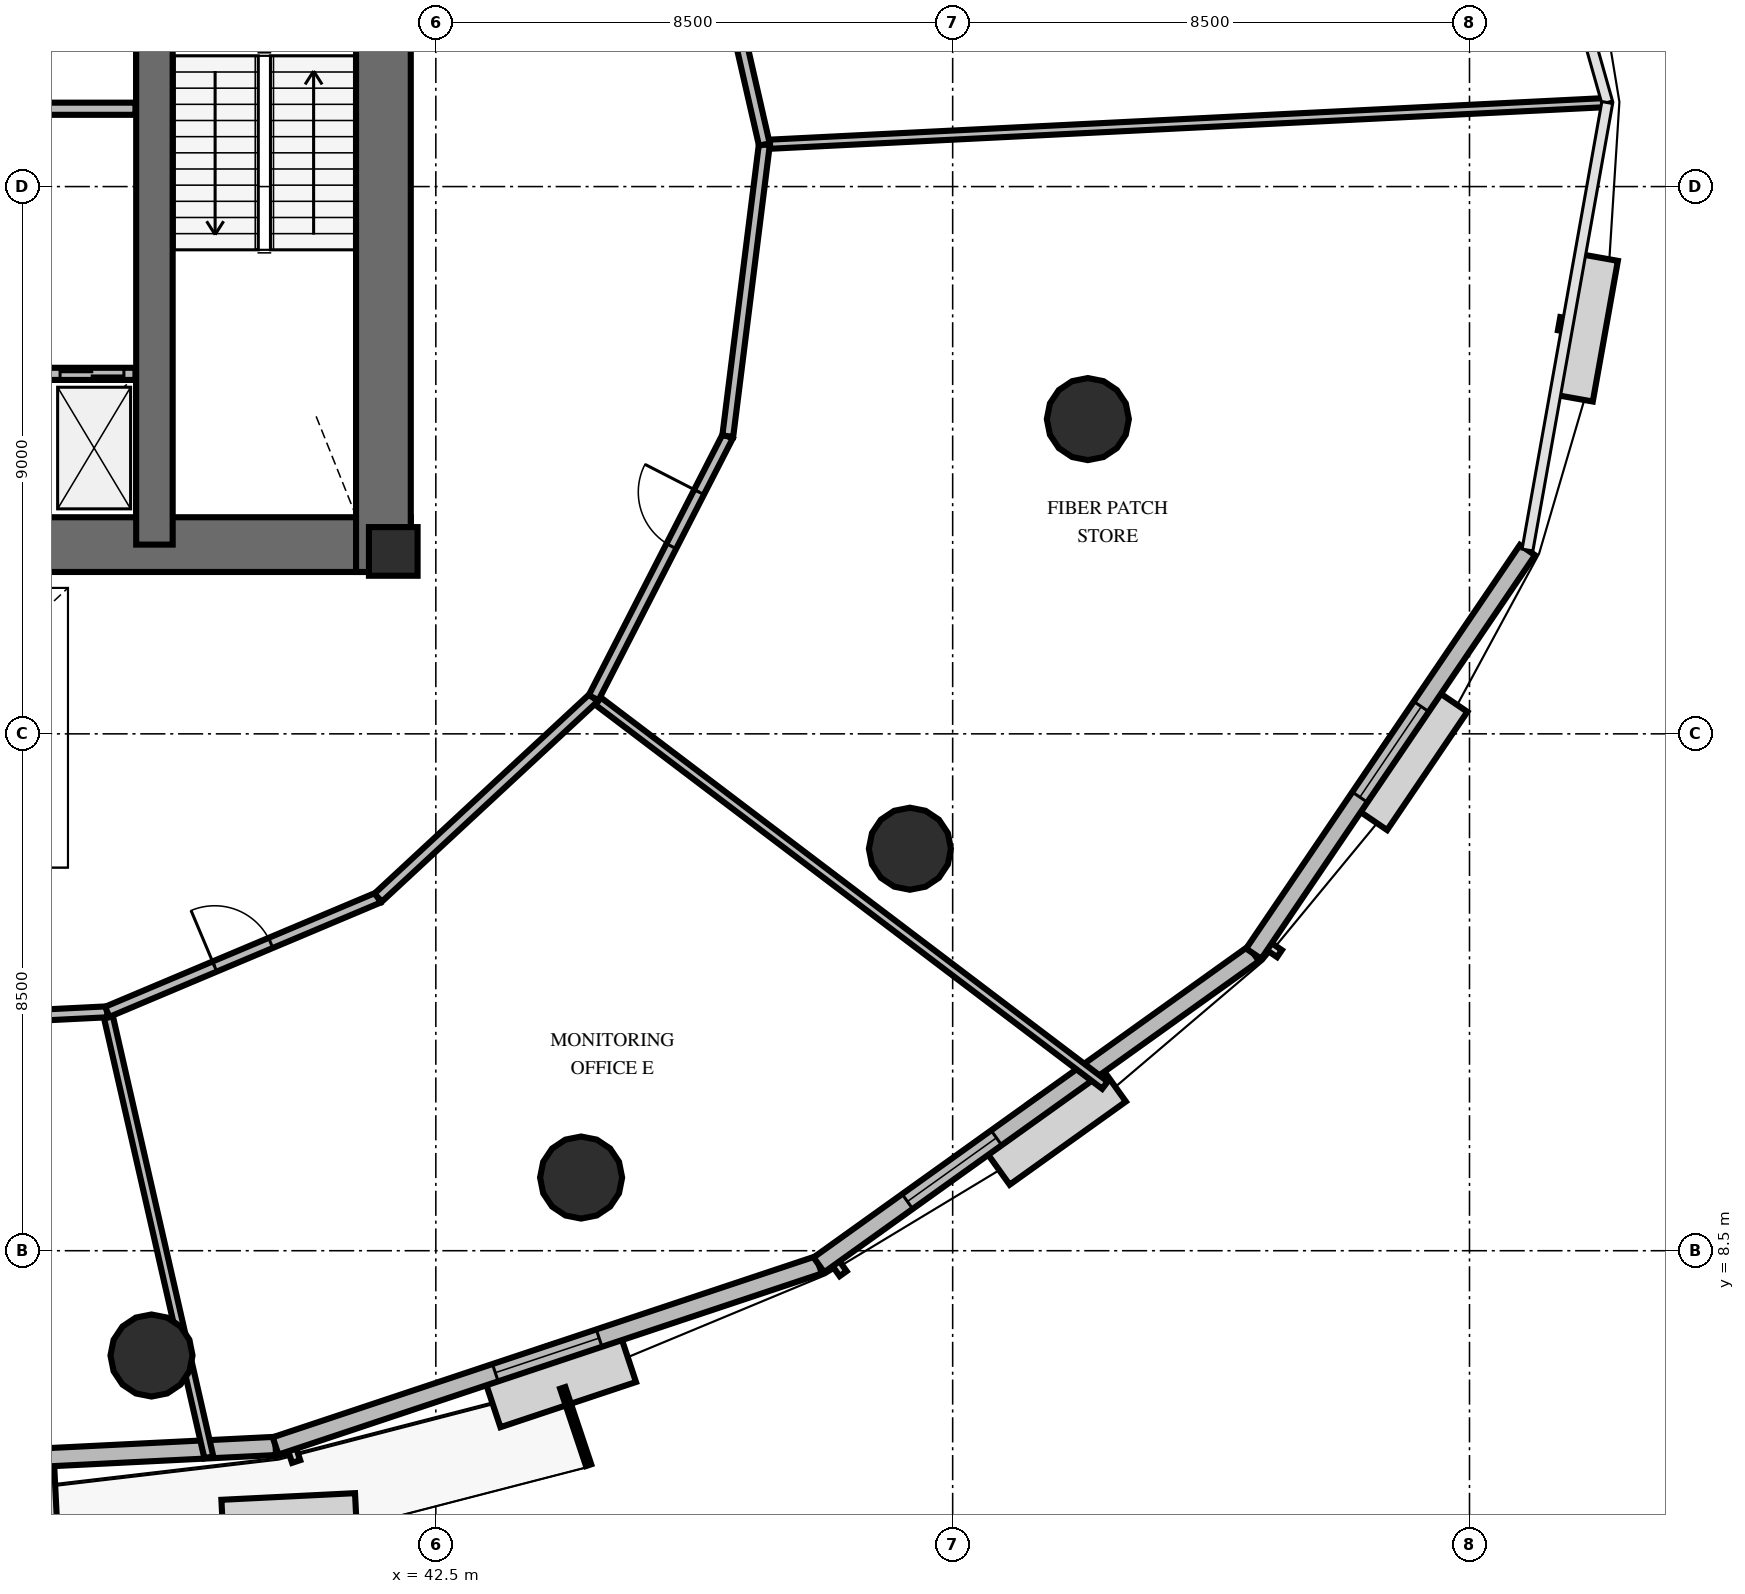
"""IFC4 building model, lengths in metres.
Left out: names, types, materials, properties, quantities, classifications, styles, units other than length and angle.
Written with IfcOpenShell. Run it as: python <this file> out.ifc"""

import sys

from ifc_helpers import new_model, si_unit, direction, frame, frame_2d, origin, origin_2d, place, context, subcontext, project, spatial, rectangle, circle, extrude, element, fill, save


model = new_model("IFC4")
c1 = context("Model", 3, precision=1e-05, world=origin(), true_north=direction((0.0, 1.0)))
c2 = subcontext(c1, "Body", "Model", "MODEL_VIEW")
j1 = project(units=[si_unit("LENGTHUNIT", "METRE"), si_unit("PLANEANGLEUNIT", "RADIAN")], contexts=[c1])
p1 = place(None, origin())
s1 = spatial("IfcSite", under=j1, at=p1, CompositionType="ELEMENT")
p2 = place(p1, origin())
s2 = spatial("IfcBuilding", under=s1, at=p2, CompositionType="ELEMENT")
p3 = place(p2, frame((0.0, 0.0, 42.6)))
s3 = spatial("IfcBuildingStorey", under=s2, at=p3, CompositionType="ELEMENT", Elevation=42.6)
p4 = place(p3, frame((25.922, 20.112, 0.0), z_axis=(0.0, 0.0, 1.0), x_axis=(1.0, 0.0, 0.0)))
e1 = element("IfcWall", 1, at=p4, inside=s3, PredefinedType="SHEAR", context=c2, shape_type="SweptSolid", body=[
    extrude(rectangle(XDim=16.166, YDim=0.9, at=frame_2d((8.083, 0.0))), origin(), (0.0, 0.0, 1.0), 4.2),
])
p5 = place(p3, frame((41.638, 19.662, 0.0), z_axis=(0.0, 0.0, 1.0), x_axis=(0.0, 1.0, 0.0)))
e2 = element("IfcWall", 2, at=p5, inside=s3, PredefinedType="SHEAR", context=c2, shape_type="SweptSolid", body=[
    extrude(rectangle(XDim=10.876, YDim=0.9, at=frame_2d((5.438, 0.0))), origin(), (0.0, 0.0, 1.0), 4.2),
])
p6 = place(p3, frame((37.872, 20.112, 0.0), z_axis=(0.0, 0.0, 1.0), x_axis=(0.0, 1.0, 0.0)))
e3 = element("IfcWall", 3, at=p6, inside=s3, PredefinedType="SHEAR", context=c2, shape_type="SweptSolid", body=[
    extrude(rectangle(XDim=9.976, YDim=0.6, at=frame_2d((4.988, 0.0))), origin(), (0.0, 0.0, 1.0), 4.2),
])
p7 = place(p3, frame((41.8, 20.0, 0.0), z_axis=(0.0, 0.0, 1.0), x_axis=(1.0, 0.0, 0.0)))
e4 = element("IfcColumn", 4, at=p7, inside=s3, PredefinedType="PILASTER", context=c2, shape_type="SweptSolid", body=[
    extrude(rectangle(XDim=0.8, YDim=0.8, at=origin_2d()), origin(), (0.0, 0.0, 1.0), 4.2),
])
for number, where, z_axis, x_axis in (
    (5, (37.824, 6.777, 0.0), (0.0, 0.0, 1.0), (1.0, 0.0, 0.0)),
    (6, (44.889, 9.703, 0.0), (0.0, 0.0, 1.0), (1.0, 0.0, 0.0)),
    (7, (50.297, 15.111, 0.0), (0.0, 0.0, 1.0), (1.0, 0.0, 0.0)),
    (8, (53.223, 22.176, 0.0), (0.0, 0.0, 1.0), (1.0, 0.0, 0.0)),
):
    element("IfcColumn", number, at=place(p3, frame(where, z_axis=z_axis, x_axis=x_axis)), inside=s3, PredefinedType="COLUMN", context=c2, shape_type="SweptSolid", body=[
        extrude(circle(Radius=0.675, at=origin_2d()), origin(), (0.0, 0.0, 1.0), 4.2),
    ])
p8 = place(p3, frame((30.221, 4.81, 0.0), z_axis=(0.0, 0.0, 1.0), x_axis=(0.998763538051, 0.049713127647, 0.0)))
e9 = element("IfcWall", 9, at=p8, inside=s3, PredefinedType="SOLIDWALL", context=c2, shape_type="SweptSolid", body=[
    extrude(rectangle(XDim=9.655, YDim=0.3, at=frame_2d((4.828, 0.0))), origin(), (0.0, 0.0, 1.0), 3.0),
])
p9 = place(p8, frame((3.23, 0.0, 0.0)))
e10 = element("IfcOpeningElement", 10, at=p9, cuts=e9, PredefinedType="OPENING", context=c2, shape_type="SweptSolid", body=[
    extrude(rectangle(XDim=1.05, YDim=2.15, at=frame_2d((0.525, 1.075))), frame((0.0, 0.16, 0.0), z_axis=(0.0, -1.0, 0.0), x_axis=(1.0, 0.0, 0.0)), (0.0, 0.0, 1.0), 0.32),
])
p10 = place(p3, frame((39.865, 5.29, 0.0), z_axis=(0.0, 0.0, 1.0), x_axis=(0.948698849343, 0.316181108314, 0.0)))
e11 = element("IfcWall", 11, at=p10, inside=s3, PredefinedType="SOLIDWALL", context=c2, shape_type="SweptSolid", body=[
    extrude(rectangle(XDim=9.419, YDim=0.3, at=frame_2d((4.709, 0.0))), origin(), (0.0, 0.0, 1.0), 3.0),
])
p11 = place(p10, frame((3.809, 0.0, 0.8)))
e12 = element("IfcOpeningElement", 12, at=p11, cuts=e11, PredefinedType="OPENING", context=c2, shape_type="SweptSolid", body=[
    extrude(rectangle(XDim=1.8, YDim=1.95, at=frame_2d((0.9, 0.975))), frame((0.0, 0.16, 0.0), z_axis=(0.0, -1.0, 0.0), x_axis=(1.0, 0.0, 0.0)), (0.0, 0.0, 1.0), 0.32),
])
p12 = place(p3, frame((48.8, 8.268, 0.0), z_axis=(0.0, 0.0, 1.0), x_axis=(0.813220978615, 0.581955015392, 0.0)))
e13 = element("IfcWall", 13, at=p12, inside=s3, PredefinedType="SOLIDWALL", context=c2, shape_type="SweptSolid", body=[
    extrude(rectangle(XDim=8.793, YDim=0.3, at=frame_2d((4.396, 0.0))), origin(), (0.0, 0.0, 1.0), 3.0),
])
p13 = place(p12, frame((1.79, 0.0, 0.8)))
e14 = element("IfcOpeningElement", 14, at=p13, cuts=e13, PredefinedType="OPENING", context=c2, shape_type="SweptSolid", body=[
    extrude(rectangle(XDim=1.8, YDim=1.95, at=frame_2d((0.9, 0.975))), frame((0.0, 0.16, 0.0), z_axis=(0.0, -1.0, 0.0), x_axis=(1.0, 0.0, 0.0)), (0.0, 0.0, 1.0), 0.32),
])
p14 = place(p3, frame((55.95, 13.385, 0.0), z_axis=(0.0, 0.0, 1.0), x_axis=(0.561354786865, 0.827575255348, 0.0)))
e15 = element("IfcWall", 15, at=p14, inside=s3, PredefinedType="SOLIDWALL", context=c2, shape_type="SweptSolid", body=[
    extrude(rectangle(XDim=8.021, YDim=0.3, at=frame_2d((4.011, 0.0))), origin(), (0.0, 0.0, 1.0), 3.0),
])
p15 = place(p14, frame((3.111, 0.0, 0.8)))
e16 = element("IfcOpeningElement", 16, at=p15, cuts=e15, PredefinedType="OPENING", context=c2, shape_type="SweptSolid", body=[
    extrude(rectangle(XDim=1.8, YDim=1.95, at=frame_2d((0.9, 0.975))), frame((0.0, 0.16, 0.0), z_axis=(0.0, -1.0, 0.0), x_axis=(1.0, 0.0, 0.0)), (0.0, 0.0, 1.0), 0.32),
])
p16 = place(p3, frame((34.75, 22.92, 0.0), z_axis=(0.0, 0.0, 1.0), x_axis=(1.0, 0.0, 0.0)))
e17 = element("IfcWall", 17, at=p16, inside=s3, PredefinedType="SOLIDWALL", context=c2, shape_type="SweptSolid", body=[
    extrude(rectangle(XDim=2.81, YDim=0.2, at=frame_2d((1.405, 0.0))), origin(), (0.0, 0.0, 1.0), 3.0),
])
p17 = place(p16, frame((0.19, 0.0, 0.0)))
e18 = element("IfcOpeningElement", 18, at=p17, cuts=e17, PredefinedType="OPENING", context=c2, shape_type="SweptSolid", body=[
    extrude(rectangle(XDim=1.05, YDim=2.1, at=frame_2d((0.525, 1.05))), frame((0.0, 0.11, 0.0), z_axis=(0.0, -1.0, 0.0), x_axis=(1.0, 0.0, 0.0)), (0.0, 0.0, 1.0), 0.22),
])
p18 = place(p16, frame((1.57, 0.0, 0.0)))
e19 = element("IfcOpeningElement", 19, at=p18, cuts=e17, PredefinedType="OPENING", context=c2, shape_type="SweptSolid", body=[
    extrude(rectangle(XDim=1.05, YDim=2.1, at=frame_2d((0.525, 1.05))), frame((0.0, 0.11, 0.0), z_axis=(0.0, -1.0, 0.0), x_axis=(1.0, 0.0, 0.0)), (0.0, 0.0, 1.0), 0.22),
])
p19 = place(p3, frame((34.75, 27.28, 0.0), z_axis=(0.0, 0.0, 1.0), x_axis=(1.0, 0.0, 0.0)))
e20 = element("IfcWall", 20, at=p19, inside=s3, PredefinedType="SOLIDWALL", context=c2, shape_type="SweptSolid", body=[
    extrude(rectangle(XDim=2.81, YDim=0.2, at=frame_2d((1.405, 0.0))), origin(), (0.0, 0.0, 1.0), 3.0),
])
p20 = place(p3, frame((37.096, 12.429, 0.0), z_axis=(0.0, 0.0, 1.0), x_axis=(0.222400432179, -0.974955408091, 0.0)))
e21 = element("IfcWall", 21, at=p20, inside=s3, PredefinedType="PARTITIONING", context=c2, shape_type="SweptSolid", body=[
    extrude(rectangle(XDim=7.514, YDim=0.15, at=frame_2d((3.757, 0.0))), origin(), (0.0, 0.0, 1.0), 3.0),
])
p21 = place(p3, frame((32.267, 12.188, 0.0), z_axis=(0.0, 0.0, 1.0), x_axis=(0.998762017283, 0.049743671286, 0.0)))
e22 = element("IfcWall", 22, at=p21, inside=s3, PredefinedType="PARTITIONING", context=c2, shape_type="SweptSolid", body=[
    extrude(rectangle(XDim=4.834, YDim=0.18, at=frame_2d((2.417, 0.0))), origin(), (0.0, 0.0, 1.0), 3.0),
])
p22 = place(p21, frame((0.996, 0.0, 0.0)))
e23 = element("IfcOpeningElement", 23, at=p22, cuts=e22, PredefinedType="OPENING", context=c2, shape_type="SweptSolid", body=[
    extrude(rectangle(XDim=1.15, YDim=2.15, at=frame_2d((0.575, 1.075))), frame((0.0, 0.1, 0.0), z_axis=(0.0, -1.0, 0.0), x_axis=(1.0, 0.0, 0.0)), (0.0, 0.0, 1.0), 0.2),
])
p23 = place(p3, frame((45.095, 17.594, 0.0), z_axis=(0.0, 0.0, 1.0), x_axis=(0.79706649603, -0.603891547305, 0.0)))
e24 = element("IfcWall", 24, at=p23, inside=s3, PredefinedType="PARTITIONING", context=c2, shape_type="SweptSolid", body=[
    extrude(rectangle(XDim=10.551, YDim=0.15, at=frame_2d((5.275, 0.0))), origin(), (0.0, 0.0, 1.0), 3.0),
])
p24 = place(p3, frame((37.096, 12.429, 0.0), z_axis=(0.0, 0.0, 1.0), x_axis=(0.921533629475, 0.388298557488, 0.0)))
e25 = element("IfcWall", 25, at=p24, inside=s3, PredefinedType="PARTITIONING", context=c2, shape_type="SweptSolid", body=[
    extrude(rectangle(XDim=4.834, YDim=0.18, at=frame_2d((2.417, 0.0))), origin(), (0.0, 0.0, 1.0), 3.0),
])
p25 = place(p24, frame((1.917, 0.0, 0.0)))
e26 = element("IfcOpeningElement", 26, at=p25, cuts=e25, PredefinedType="OPENING", context=c2, shape_type="SweptSolid", body=[
    extrude(rectangle(XDim=1.0, YDim=2.15, at=frame_2d((0.5, 1.075))), frame((0.0, 0.1, 0.0), z_axis=(0.0, -1.0, 0.0), x_axis=(1.0, 0.0, 0.0)), (0.0, 0.0, 1.0), 0.2),
])
p26 = place(p3, frame((41.551, 14.306, 0.0), z_axis=(0.0, 0.0, 1.0), x_axis=(0.733122561519, 0.680096544464, 0.0)))
e27 = element("IfcWall", 27, at=p26, inside=s3, PredefinedType="PARTITIONING", context=c2, shape_type="SweptSolid", body=[
    extrude(rectangle(XDim=4.834, YDim=0.18, at=frame_2d((2.417, 0.0))), origin(), (0.0, 0.0, 1.0), 3.0),
])
p27 = place(p3, frame((47.903, 26.692, 0.0), z_axis=(0.0, 0.0, 1.0), x_axis=(0.99876293138, 0.049725314484, 0.0)))
e28 = element("IfcWall", 28, at=p27, inside=s3, PredefinedType="PARTITIONING", context=c2, shape_type="SweptSolid", body=[
    extrude(rectangle(XDim=13.88, YDim=0.15, at=frame_2d((6.94, 0.0))), origin(), (0.0, 0.0, 1.0), 3.0),
])
p28 = place(p3, frame((45.095, 17.594, 0.0), z_axis=(0.0, 0.0, 1.0), x_axis=(0.45634125461, 0.889804843402, 0.0)))
e29 = element("IfcWall", 29, at=p28, inside=s3, PredefinedType="PARTITIONING", context=c2, shape_type="SweptSolid", body=[
    extrude(rectangle(XDim=4.834, YDim=0.18, at=frame_2d((2.417, 0.0))), origin(), (0.0, 0.0, 1.0), 3.0),
])
p29 = place(p28, frame((2.801, 0.0, 0.0)))
e30 = element("IfcOpeningElement", 30, at=p29, cuts=e29, PredefinedType="OPENING", context=c2, shape_type="SweptSolid", body=[
    extrude(rectangle(XDim=1.0, YDim=2.15, at=frame_2d((0.5, 1.075))), frame((0.0, 0.1, 0.0), z_axis=(0.0, -1.0, 0.0), x_axis=(1.0, 0.0, 0.0)), (0.0, 0.0, 1.0), 0.2),
])
p30 = place(p3, frame((47.301, 21.895, 0.0), z_axis=(0.0, 0.0, 1.0), x_axis=(0.124482228692, 0.992221837464, 0.0)))
e31 = element("IfcWall", 31, at=p30, inside=s3, PredefinedType="PARTITIONING", context=c2, shape_type="SweptSolid", body=[
    extrude(rectangle(XDim=4.834, YDim=0.18, at=frame_2d((2.417, 0.0))), origin(), (0.0, 0.0, 1.0), 3.0),
])
p31 = place(p3, frame((47.903, 26.692, 0.0), z_axis=(0.0, 0.0, 1.0), x_axis=(-0.222402444604, 0.974954949028, 0.0)))
e32 = element("IfcWall", 32, at=p31, inside=s3, PredefinedType="PARTITIONING", context=c2, shape_type="SweptSolid", body=[
    extrude(rectangle(XDim=4.834, YDim=0.18, at=frame_2d((2.417, 0.0))), origin(), (0.0, 0.0, 1.0), 3.0),
])
p32 = place(p31, frame((2.801, 0.0, 0.0)))
e33 = element("IfcOpeningElement", 33, at=p32, cuts=e32, PredefinedType="OPENING", context=c2, shape_type="SweptSolid", body=[
    extrude(rectangle(XDim=1.0, YDim=2.15, at=frame_2d((0.5, 1.075))), frame((0.0, 0.1, 0.0), z_axis=(0.0, -1.0, 0.0), x_axis=(1.0, 0.0, 0.0)), (0.0, 0.0, 1.0), 0.2),
])
p33 = place(p11, origin())
e34 = element("IfcWindow", 34, at=p33, inside=s3, PartitioningType="SINGLE_PANEL", PredefinedType="WINDOW", context=c2, shape_type="SweptSolid", body=[
    extrude(rectangle(XDim=1.8, YDim=1.95, at=frame_2d((0.9, 0.975))), frame((0.0, 0.03, 0.0), z_axis=(0.0, -1.0, 0.0), x_axis=(1.0, 0.0, 0.0)), (0.0, 0.0, 1.0), 0.06),
])
fill(e12, e34)
p34 = place(p13, origin())
e35 = element("IfcWindow", 35, at=p34, inside=s3, PartitioningType="SINGLE_PANEL", PredefinedType="WINDOW", context=c2, shape_type="SweptSolid", body=[
    extrude(rectangle(XDim=1.8, YDim=1.95, at=frame_2d((0.9, 0.975))), frame((0.0, 0.03, 0.0), z_axis=(0.0, -1.0, 0.0), x_axis=(1.0, 0.0, 0.0)), (0.0, 0.0, 1.0), 0.06),
])
fill(e14, e35)
p35 = place(p15, origin())
e36 = element("IfcWindow", 36, at=p35, inside=s3, PartitioningType="SINGLE_PANEL", PredefinedType="WINDOW", context=c2, shape_type="SweptSolid", body=[
    extrude(rectangle(XDim=1.8, YDim=1.95, at=frame_2d((0.9, 0.975))), frame((0.0, 0.03, 0.0), z_axis=(0.0, -1.0, 0.0), x_axis=(1.0, 0.0, 0.0)), (0.0, 0.0, 1.0), 0.06),
])
fill(e16, e36)
p36 = place(p18, origin())
e37 = element("IfcDoor", 37, at=p36, inside=s3, OperationType="DOUBLE_DOOR_SLIDING", PredefinedType="USERDEFINED", context=c2, shape_type="SweptSolid", body=[
    extrude(rectangle(XDim=1.05, YDim=2.1, at=frame_2d((0.525, 1.05))), frame((0.0, 0.025, 0.0), z_axis=(0.0, -1.0, 0.0), x_axis=(1.0, 0.0, 0.0)), (0.0, 0.0, 1.0), 0.05),
])
fill(e19, e37)
p37 = place(p25, origin())
e38 = element("IfcDoor", 38, at=p37, inside=s3, OperationType="SINGLE_SWING_LEFT", PredefinedType="DOOR", context=c2, shape_type="SweptSolid", body=[
    extrude(rectangle(XDim=1.0, YDim=2.15, at=frame_2d((0.5, 1.075))), frame((0.0, 0.025, 0.0), z_axis=(0.0, -1.0, 0.0), x_axis=(1.0, 0.0, 0.0)), (0.0, 0.0, 1.0), 0.05),
])
fill(e26, e38)
p38 = place(p29, origin())
e39 = element("IfcDoor", 39, at=p38, inside=s3, OperationType="SINGLE_SWING_RIGHT", PredefinedType="DOOR", context=c2, shape_type="SweptSolid", body=[
    extrude(rectangle(XDim=1.0, YDim=2.15, at=frame_2d((0.5, 1.075))), frame((0.0, 0.025, 0.0), z_axis=(0.0, -1.0, 0.0), x_axis=(1.0, 0.0, 0.0)), (0.0, 0.0, 1.0), 0.05),
])
fill(e30, e39)
save(model, sys.argv[1])
